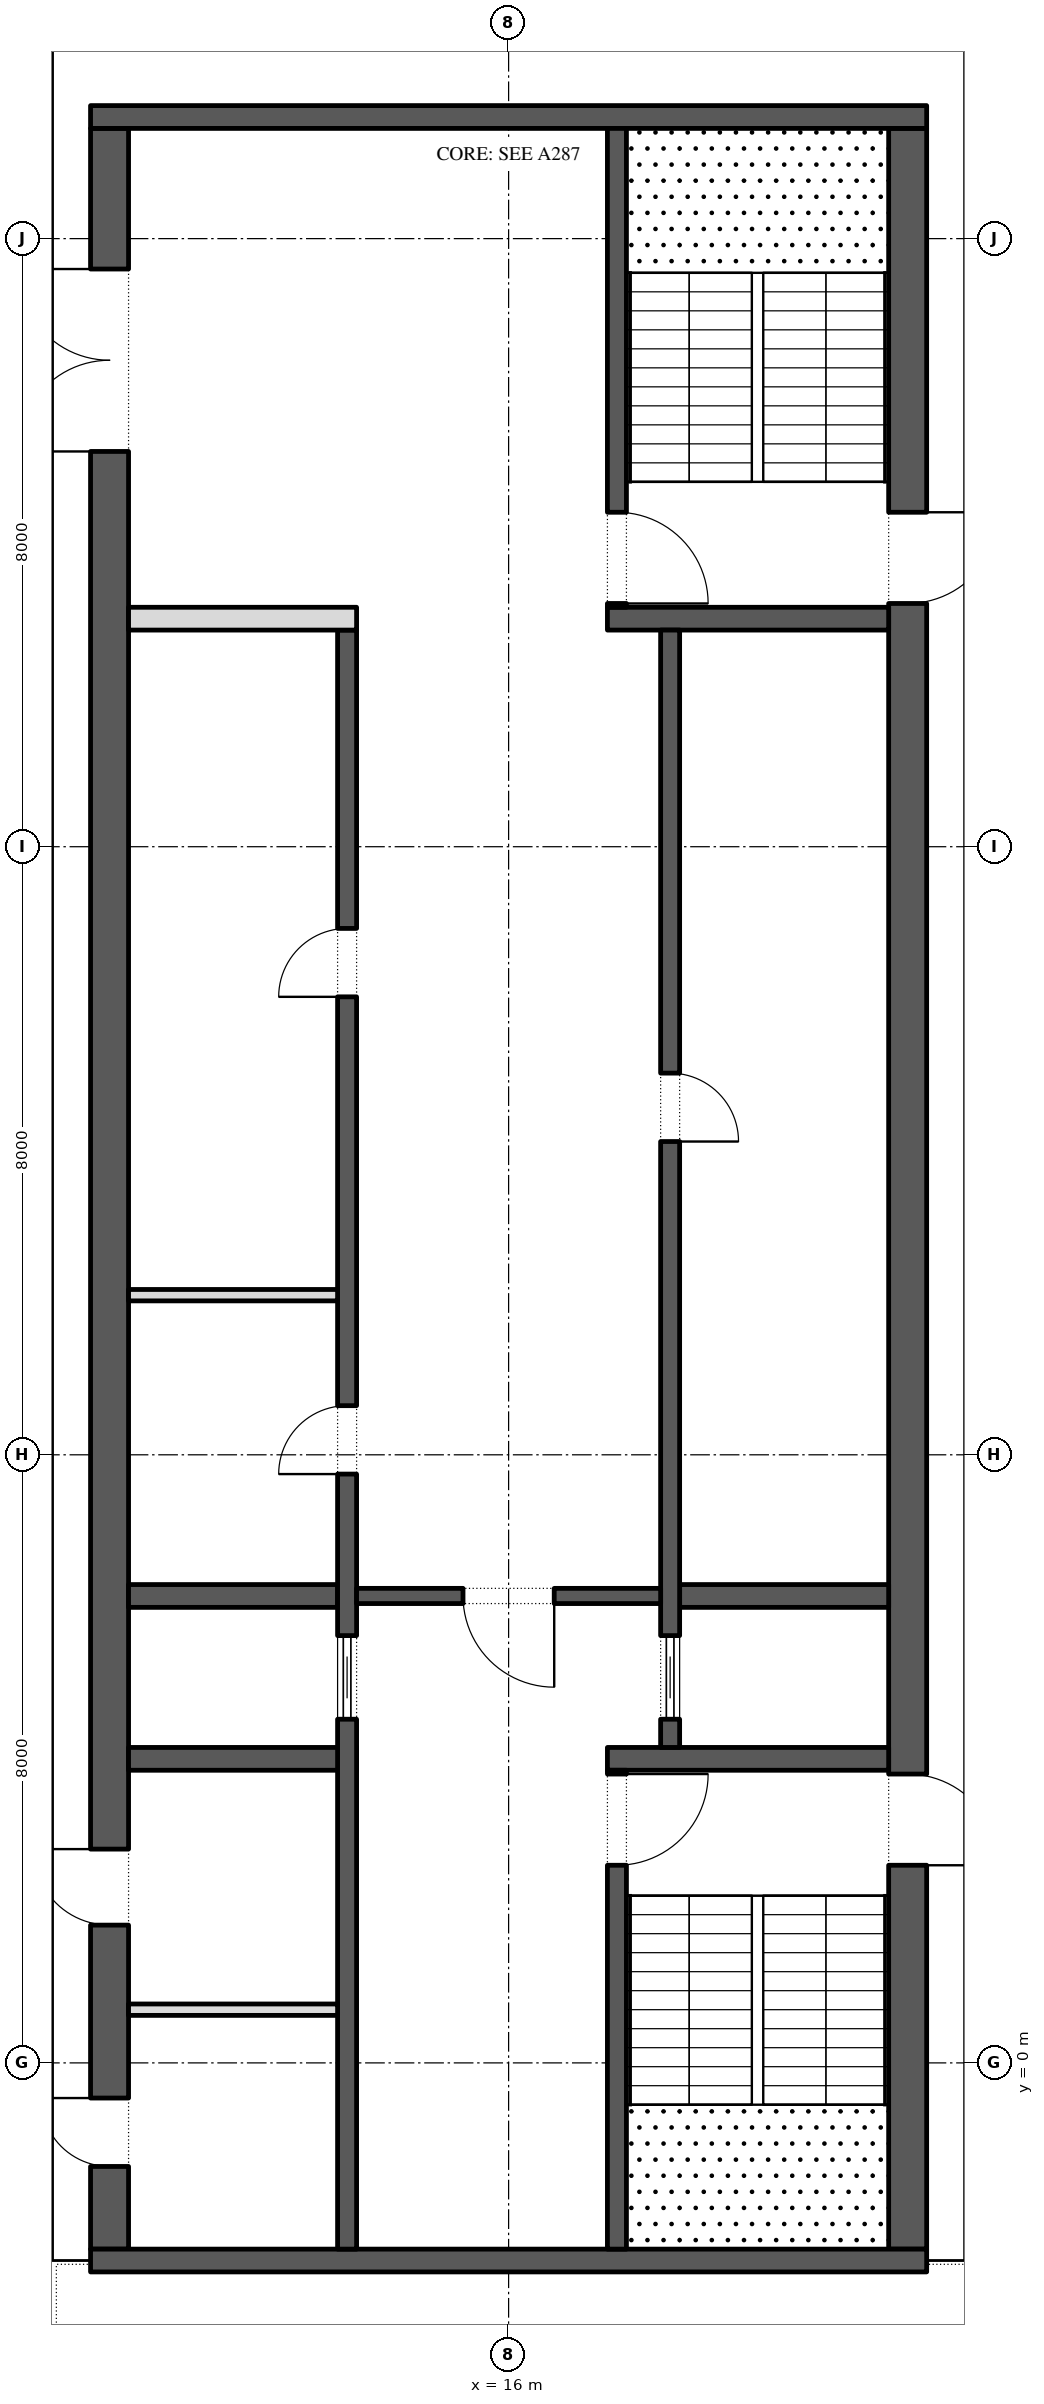
"""IFC4 building model, lengths in metres.
Left out: names, types, materials, properties, quantities, classifications, styles, units other than length and angle.
Written with IfcOpenShell. Run it as: python <this file> out.ifc"""

import sys

from ifc_helpers import new_model, si_unit, direction, frame, frame_2d, origin, place, context, subcontext, project, spatial, rectangle, extrude, element, fill, save


model = new_model("IFC4")
c1 = context("Model", 3, precision=1e-05, world=origin(), true_north=direction((0.0, 1.0)))
c2 = subcontext(c1, "Body", "Model", "MODEL_VIEW")
j1 = project(units=[si_unit("LENGTHUNIT", "METRE"), si_unit("PLANEANGLEUNIT", "RADIAN")], contexts=[c1])
p1 = place(None, origin())
s1 = spatial("IfcSite", under=j1, at=p1, CompositionType="ELEMENT")
p2 = place(p1, origin())
s2 = spatial("IfcBuilding", under=s1, at=p2, CompositionType="ELEMENT")
p3 = place(p2, frame((0.0, 0.0, 381.6)))
s3 = spatial("IfcBuildingStorey", under=s2, at=p3, CompositionType="ELEMENT", Elevation=381.6)
p4 = place(p3, frame((21.25, -2.45, 0.0), z_axis=(0.0, 0.0, 1.0), x_axis=(0.0, 1.0, 0.0)))
e1 = element("IfcWall", 1, at=p4, inside=s3, PredefinedType="SHEAR", context=c2, shape_type="SweptSolid", body=[
    extrude(rectangle(XDim=27.9, YDim=0.5, at=frame_2d((13.95, 0.0))), origin(), (0.0, 0.0, 1.0), 4.0),
])
p5 = place(p4, frame((5.05, 0.0, 0.0)))
e2 = element("IfcOpeningElement", 2, at=p5, cuts=e1, PredefinedType="OPENING", context=c2, shape_type="SweptSolid", body=[
    extrude(rectangle(XDim=1.2, YDim=2.1, at=frame_2d((0.6, 1.05))), frame((0.0, 0.26, 0.0), z_axis=(0.0, -1.0, 0.0), x_axis=(1.0, 0.0, 0.0)), (0.0, 0.0, 1.0), 0.52),
])
p6 = place(p4, frame((21.65, 0.0, 0.0)))
e3 = element("IfcOpeningElement", 3, at=p6, cuts=e1, PredefinedType="OPENING", context=c2, shape_type="SweptSolid", body=[
    extrude(rectangle(XDim=1.2, YDim=2.1, at=frame_2d((0.6, 1.05))), frame((0.0, 0.26, 0.0), z_axis=(0.0, -1.0, 0.0), x_axis=(1.0, 0.0, 0.0)), (0.0, 0.0, 1.0), 0.52),
])
p7 = place(p3, frame((10.75, -2.45, 0.0), z_axis=(0.0, 0.0, 1.0), x_axis=(0.0, 1.0, 0.0)))
e4 = element("IfcWall", 4, at=p7, inside=s3, PredefinedType="SHEAR", context=c2, shape_type="SweptSolid", body=[
    extrude(rectangle(XDim=27.9, YDim=0.5, at=frame_2d((13.95, 0.0))), origin(), (0.0, 0.0, 1.0), 4.0),
])
p8 = place(p7, frame((23.65, 0.0, 0.0)))
e5 = element("IfcOpeningElement", 5, at=p8, cuts=e4, PredefinedType="OPENING", context=c2, shape_type="SweptSolid", body=[
    extrude(rectangle(XDim=2.4, YDim=2.1, at=frame_2d((1.2, 1.05))), frame((0.0, 0.26, 0.0), z_axis=(0.0, -1.0, 0.0), x_axis=(1.0, 0.0, 0.0)), (0.0, 0.0, 1.0), 0.52),
])
p9 = place(p7, frame((1.087, 0.0, 0.0)))
e6 = element("IfcOpeningElement", 6, at=p9, cuts=e4, PredefinedType="OPENING", context=c2, shape_type="SweptSolid", body=[
    extrude(rectangle(XDim=0.9, YDim=2.1, at=frame_2d((0.45, 1.05))), frame((0.0, 0.26, 0.0), z_axis=(0.0, -1.0, 0.0), x_axis=(1.0, 0.0, 0.0)), (0.0, 0.0, 1.0), 0.52),
])
p10 = place(p7, frame((4.262, 0.0, 0.0)))
e7 = element("IfcOpeningElement", 7, at=p10, cuts=e4, PredefinedType="OPENING", context=c2, shape_type="SweptSolid", body=[
    extrude(rectangle(XDim=1.0, YDim=2.1, at=frame_2d((0.5, 1.05))), frame((0.0, 0.26, 0.0), z_axis=(0.0, -1.0, 0.0), x_axis=(1.0, 0.0, 0.0)), (0.0, 0.0, 1.0), 0.52),
])
for number, where, z_axis, x_axis in (
    (8, (10.5, -2.6, 0.0), (0.0, 0.0, 1.0), (1.0, 0.0, 0.0)),
    (9, (10.5, 25.6, 0.0), (0.0, 0.0, 1.0), (1.0, 0.0, 0.0)),
):
    element("IfcWall", number, at=place(p3, frame(where, z_axis=z_axis, x_axis=x_axis)), inside=s3, PredefinedType="SHEAR", context=c2, shape_type="SweptSolid", body=[
        extrude(rectangle(XDim=11.0, YDim=0.3, at=frame_2d((5.5, 0.0))), origin(), (0.0, 0.0, 1.0), 4.0),
    ])
p11 = place(p3, frame((17.3, 4.0, 0.0), z_axis=(0.0, 0.0, 1.0), x_axis=(1.0, 0.0, 0.0)))
e10 = element("IfcWall", 10, at=p11, inside=s3, PredefinedType="SHEAR", context=c2, shape_type="SweptSolid", body=[
    extrude(rectangle(XDim=3.7, YDim=0.3, at=frame_2d((1.85, 0.0))), origin(), (0.0, 0.0, 1.0), 4.0),
])
p12 = place(p3, frame((17.425, -2.45, 0.0), z_axis=(0.0, 0.0, 1.0), x_axis=(0.0, 1.0, 0.0)))
e11 = element("IfcWall", 11, at=p12, inside=s3, PredefinedType="SHEAR", context=c2, shape_type="SweptSolid", body=[
    extrude(rectangle(XDim=6.3, YDim=0.25, at=frame_2d((3.15, 0.0))), origin(), (0.0, 0.0, 1.0), 4.0),
])
p13 = place(p12, frame((5.05, 0.0, 0.0)))
e12 = element("IfcOpeningElement", 12, at=p13, cuts=e11, PredefinedType="OPENING", context=c2, shape_type="SweptSolid", body=[
    extrude(rectangle(XDim=1.2, YDim=2.1, at=frame_2d((0.6, 1.05))), frame((0.0, 0.135, 0.0), z_axis=(0.0, -1.0, 0.0), x_axis=(1.0, 0.0, 0.0)), (0.0, 0.0, 1.0), 0.27),
])
p14 = place(p3, frame((17.3, 19.0, 0.0), z_axis=(0.0, 0.0, 1.0), x_axis=(1.0, 0.0, 0.0)))
e13 = element("IfcWall", 13, at=p14, inside=s3, PredefinedType="SHEAR", context=c2, shape_type="SweptSolid", body=[
    extrude(rectangle(XDim=3.7, YDim=0.3, at=frame_2d((1.85, 0.0))), origin(), (0.0, 0.0, 1.0), 4.0),
])
p15 = place(p3, frame((17.425, 19.15, 0.0), z_axis=(0.0, 0.0, 1.0), x_axis=(0.0, 1.0, 0.0)))
e14 = element("IfcWall", 14, at=p15, inside=s3, PredefinedType="SHEAR", context=c2, shape_type="SweptSolid", body=[
    extrude(rectangle(XDim=6.3, YDim=0.25, at=frame_2d((3.15, 0.0))), origin(), (0.0, 0.0, 1.0), 4.0),
])
p16 = place(p15, frame((0.05, 0.0, 0.0)))
e15 = element("IfcOpeningElement", 15, at=p16, cuts=e14, PredefinedType="OPENING", context=c2, shape_type="SweptSolid", body=[
    extrude(rectangle(XDim=1.2, YDim=2.1, at=frame_2d((0.6, 1.05))), frame((0.0, 0.135, 0.0), z_axis=(0.0, -1.0, 0.0), x_axis=(1.0, 0.0, 0.0)), (0.0, 0.0, 1.0), 0.27),
])
p17 = place(p3, frame((18.25, 6.143, 0.0), z_axis=(0.0, 0.0, 1.0), x_axis=(1.0, 0.0, 0.0)))
e16 = element("IfcWall", 16, at=p17, inside=s3, PredefinedType="SHEAR", context=c2, shape_type="SweptSolid", body=[
    extrude(rectangle(XDim=2.75, YDim=0.3, at=frame_2d((1.375, 0.0))), origin(), (0.0, 0.0, 1.0), 4.0),
])
p18 = place(p3, frame((18.125, 4.15, 0.0), z_axis=(0.0, 0.0, 1.0), x_axis=(0.0, 1.0, 0.0)))
e17 = element("IfcWall", 17, at=p18, inside=s3, PredefinedType="SHEAR", context=c2, shape_type="SweptSolid", body=[
    extrude(rectangle(XDim=14.7, YDim=0.25, at=frame_2d((7.35, 0.0))), origin(), (0.0, 0.0, 1.0), 4.0),
])
p19 = place(p18, frame((7.971, 0.0, 0.0)))
e18 = element("IfcOpeningElement", 18, at=p19, cuts=e17, PredefinedType="OPENING", context=c2, shape_type="SweptSolid", body=[
    extrude(rectangle(XDim=0.9, YDim=2.1, at=frame_2d((0.45, 1.05))), frame((0.0, 0.135, 0.0), z_axis=(0.0, -1.0, 0.0), x_axis=(1.0, 0.0, 0.0)), (0.0, 0.0, 1.0), 0.27),
])
p20 = place(p18, frame((0.371, 0.0, 0.0)))
e19 = element("IfcOpeningElement", 19, at=p20, cuts=e17, PredefinedType="OPENING", context=c2, shape_type="SweptSolid", body=[
    extrude(rectangle(XDim=1.1, YDim=2.1, at=frame_2d((0.55, 1.05))), frame((0.0, 0.135, 0.0), z_axis=(0.0, -1.0, 0.0), x_axis=(1.0, 0.0, 0.0)), (0.0, 0.0, 1.0), 0.27),
])
p21 = place(p3, frame((11.0, 4.0, 0.0), z_axis=(0.0, 0.0, 1.0), x_axis=(1.0, 0.0, 0.0)))
e20 = element("IfcWall", 20, at=p21, inside=s3, PredefinedType="SHEAR", context=c2, shape_type="SweptSolid", body=[
    extrude(rectangle(XDim=3.0, YDim=0.3, at=frame_2d((1.5, 0.0))), origin(), (0.0, 0.0, 1.0), 4.0),
])
p22 = place(p3, frame((11.0, 6.143, 0.0), z_axis=(0.0, 0.0, 1.0), x_axis=(1.0, 0.0, 0.0)))
e21 = element("IfcWall", 21, at=p22, inside=s3, PredefinedType="SHEAR", context=c2, shape_type="SweptSolid", body=[
    extrude(rectangle(XDim=2.75, YDim=0.3, at=frame_2d((1.375, 0.0))), origin(), (0.0, 0.0, 1.0), 4.0),
])
p23 = place(p3, frame((13.875, -2.45, 0.0), z_axis=(0.0, 0.0, 1.0), x_axis=(0.0, 1.0, 0.0)))
e22 = element("IfcWall", 22, at=p23, inside=s3, PredefinedType="SHEAR", context=c2, shape_type="SweptSolid", body=[
    extrude(rectangle(XDim=21.3, YDim=0.25, at=frame_2d((10.65, 0.0))), origin(), (0.0, 0.0, 1.0), 4.0),
])
p24 = place(p23, frame((10.196, 0.0, 0.0)))
e23 = element("IfcOpeningElement", 23, at=p24, cuts=e22, PredefinedType="OPENING", context=c2, shape_type="SweptSolid", body=[
    extrude(rectangle(XDim=0.9, YDim=2.1, at=frame_2d((0.45, 1.05))), frame((0.0, 0.135, 0.0), z_axis=(0.0, -1.0, 0.0), x_axis=(1.0, 0.0, 0.0)), (0.0, 0.0, 1.0), 0.27),
])
p25 = place(p23, frame((16.475, 0.0, 0.0)))
e24 = element("IfcOpeningElement", 24, at=p25, cuts=e22, PredefinedType="OPENING", context=c2, shape_type="SweptSolid", body=[
    extrude(rectangle(XDim=0.9, YDim=2.1, at=frame_2d((0.45, 1.05))), frame((0.0, 0.135, 0.0), z_axis=(0.0, -1.0, 0.0), x_axis=(1.0, 0.0, 0.0)), (0.0, 0.0, 1.0), 0.27),
])
p26 = place(p23, frame((6.971, 0.0, 0.0)))
e25 = element("IfcOpeningElement", 25, at=p26, cuts=e22, PredefinedType="OPENING", context=c2, shape_type="SweptSolid", body=[
    extrude(rectangle(XDim=1.1, YDim=2.1, at=frame_2d((0.55, 1.05))), frame((0.0, 0.135, 0.0), z_axis=(0.0, -1.0, 0.0), x_axis=(1.0, 0.0, 0.0)), (0.0, 0.0, 1.0), 0.27),
])
p27 = place(p3, frame((11.0, 19.0, 0.0), z_axis=(0.0, 0.0, 1.0), x_axis=(1.0, 0.0, 0.0)))
e26 = element("IfcWall", 26, at=p27, inside=s3, PredefinedType="PARTITIONING", context=c2, shape_type="SweptSolid", body=[
    extrude(rectangle(XDim=3.0, YDim=0.3, at=frame_2d((1.5, 0.0))), origin(), (0.0, 0.0, 1.0), 4.0),
])
p28 = place(p3, frame((11.0, 10.1, 0.0), z_axis=(0.0, 0.0, 1.0), x_axis=(1.0, 0.0, 0.0)))
e27 = element("IfcWall", 27, at=p28, inside=s3, PredefinedType="PARTITIONING", context=c2, shape_type="SweptSolid", body=[
    extrude(rectangle(XDim=2.75, YDim=0.15, at=frame_2d((1.375, 0.0))), origin(), (0.0, 0.0, 1.0), 4.0),
])
p29 = place(p3, frame((14.0, 6.143, 0.0), z_axis=(0.0, 0.0, 1.0), x_axis=(1.0, 0.0, 0.0)))
e28 = element("IfcWall", 28, at=p29, inside=s3, PredefinedType="SHEAR", context=c2, shape_type="SweptSolid", body=[
    extrude(rectangle(XDim=4.0, YDim=0.2, at=frame_2d((2.0, 0.0))), origin(), (0.0, 0.0, 1.0), 4.0),
])
p30 = place(p29, frame((1.4, 0.0, 0.0)))
e29 = element("IfcOpeningElement", 29, at=p30, cuts=e28, PredefinedType="OPENING", context=c2, shape_type="SweptSolid", body=[
    extrude(rectangle(XDim=1.2, YDim=2.1, at=frame_2d((0.6, 1.05))), frame((0.0, 0.11, 0.0), z_axis=(0.0, -1.0, 0.0), x_axis=(1.0, 0.0, 0.0)), (0.0, 0.0, 1.0), 0.22),
])
p31 = place(p3, frame((11.0, 0.7, 0.0), z_axis=(0.0, 0.0, 1.0), x_axis=(1.0, 0.0, 0.0)))
e30 = element("IfcWall", 30, at=p31, inside=s3, PredefinedType="PARTITIONING", context=c2, shape_type="SweptSolid", body=[
    extrude(rectangle(XDim=2.75, YDim=0.15, at=frame_2d((1.375, 0.0))), origin(), (0.0, 0.0, 1.0), 4.0),
])
p32 = place(p19, frame((0.9, -0.2, 0.0), z_axis=(0.0, 0.0, 1.0), x_axis=(-1.0, 0.0, 0.0)))
e31 = element("IfcDoor", 31, at=p32, inside=s3, OperationType="SINGLE_SWING_LEFT", PredefinedType="DOOR", context=c2, shape_type="SweptSolid", body=[
    extrude(rectangle(XDim=0.9, YDim=2.1, at=frame_2d((0.45, 1.05))), frame((0.0, -0.075, 0.0), z_axis=(0.0, -1.0, 0.0), x_axis=(1.0, 0.0, 0.0)), (0.0, 0.0, 1.0), 0.05),
])
fill(e18, e31)
p33 = place(p20, origin())
e32 = element("IfcDoor", 32, at=p33, inside=s3, OperationType="SLIDING_TO_LEFT", PredefinedType="DOOR", context=c2, shape_type="SweptSolid", body=[
    extrude(rectangle(XDim=1.1, YDim=2.1, at=frame_2d((0.55, 1.05))), frame((0.0, 0.025, 0.0), z_axis=(0.0, -1.0, 0.0), x_axis=(1.0, 0.0, 0.0)), (0.0, 0.0, 1.0), 0.05),
])
fill(e19, e32)
p34 = place(p24, origin())
e33 = element("IfcDoor", 33, at=p34, inside=s3, OperationType="SINGLE_SWING_RIGHT", PredefinedType="DOOR", context=c2, shape_type="SweptSolid", body=[
    extrude(rectangle(XDim=0.9, YDim=2.1, at=frame_2d((0.45, 1.05))), frame((0.0, 0.125, 0.0), z_axis=(0.0, -1.0, 0.0), x_axis=(1.0, 0.0, 0.0)), (0.0, 0.0, 1.0), 0.05),
])
fill(e23, e33)
p35 = place(p25, origin())
e34 = element("IfcDoor", 34, at=p35, inside=s3, OperationType="SINGLE_SWING_RIGHT", PredefinedType="DOOR", context=c2, shape_type="SweptSolid", body=[
    extrude(rectangle(XDim=0.9, YDim=2.1, at=frame_2d((0.45, 1.05))), frame((0.0, 0.125, 0.0), z_axis=(0.0, -1.0, 0.0), x_axis=(1.0, 0.0, 0.0)), (0.0, 0.0, 1.0), 0.05),
])
fill(e24, e34)
p36 = place(p26, origin())
e35 = element("IfcDoor", 35, at=p36, inside=s3, OperationType="SLIDING_TO_LEFT", PredefinedType="DOOR", context=c2, shape_type="SweptSolid", body=[
    extrude(rectangle(XDim=1.1, YDim=2.1, at=frame_2d((0.55, 1.05))), frame((0.0, 0.025, 0.0), z_axis=(0.0, -1.0, 0.0), x_axis=(1.0, 0.0, 0.0)), (0.0, 0.0, 1.0), 0.05),
])
fill(e25, e35)
p37 = place(p30, frame((1.2, 0.0, 0.0), z_axis=(0.0, 0.0, 1.0), x_axis=(-1.0, 0.0, 0.0)))
e36 = element("IfcDoor", 36, at=p37, inside=s3, OperationType="SINGLE_SWING_RIGHT", PredefinedType="DOOR", context=c2, shape_type="SweptSolid", body=[
    extrude(rectangle(XDim=1.2, YDim=2.1, at=frame_2d((0.6, 1.05))), frame((0.0, 0.025, 0.0), z_axis=(0.0, -1.0, 0.0), x_axis=(1.0, 0.0, 0.0)), (0.0, 0.0, 1.0), 0.05),
])
fill(e29, e36)
p38 = place(p8, origin())
e37 = element("IfcDoor", 37, at=p38, inside=s3, OperationType="DOUBLE_DOOR_SINGLE_SWING", PredefinedType="DOOR", context=c2, shape_type="SweptSolid", body=[
    extrude(rectangle(XDim=2.4, YDim=2.1, at=frame_2d((1.2, 1.05))), frame((0.0, 0.025, 0.0), z_axis=(0.0, -1.0, 0.0), x_axis=(1.0, 0.0, 0.0)), (0.0, 0.0, 1.0), 0.05),
])
fill(e5, e37)
p39 = place(p13, frame((1.2, 0.0, 0.0), z_axis=(0.0, 0.0, 1.0), x_axis=(-1.0, 0.0, 0.0)))
e38 = element("IfcDoor", 38, at=p39, inside=s3, OperationType="SINGLE_SWING_RIGHT", PredefinedType="DOOR", context=c2, shape_type="SweptSolid", body=[
    extrude(rectangle(XDim=1.2, YDim=2.1, at=frame_2d((0.6, 1.05))), frame((0.0, 0.025, 0.0), z_axis=(0.0, -1.0, 0.0), x_axis=(1.0, 0.0, 0.0)), (0.0, 0.0, 1.0), 0.05),
])
fill(e12, e38)
p40 = place(p5, frame((1.2, 0.0, 0.0), z_axis=(0.0, 0.0, 1.0), x_axis=(-1.0, 0.0, 0.0)))
e39 = element("IfcDoor", 39, at=p40, inside=s3, OperationType="SINGLE_SWING_LEFT", PredefinedType="DOOR", context=c2, shape_type="SweptSolid", body=[
    extrude(rectangle(XDim=1.2, YDim=2.1, at=frame_2d((0.6, 1.05))), frame((0.0, 0.025, 0.0), z_axis=(0.0, -1.0, 0.0), x_axis=(1.0, 0.0, 0.0)), (0.0, 0.0, 1.0), 0.05),
])
fill(e2, e39)
p41 = place(p16, frame((1.2, 0.0, 0.0), z_axis=(0.0, 0.0, 1.0), x_axis=(-1.0, 0.0, 0.0)))
e40 = element("IfcDoor", 40, at=p41, inside=s3, OperationType="SINGLE_SWING_LEFT", PredefinedType="DOOR", context=c2, shape_type="SweptSolid", body=[
    extrude(rectangle(XDim=1.2, YDim=2.1, at=frame_2d((0.6, 1.05))), frame((0.0, 0.025, 0.0), z_axis=(0.0, -1.0, 0.0), x_axis=(1.0, 0.0, 0.0)), (0.0, 0.0, 1.0), 0.05),
])
fill(e15, e40)
p42 = place(p6, frame((1.2, 0.0, 0.0), z_axis=(0.0, 0.0, 1.0), x_axis=(-1.0, 0.0, 0.0)))
e41 = element("IfcDoor", 41, at=p42, inside=s3, OperationType="SINGLE_SWING_RIGHT", PredefinedType="DOOR", context=c2, shape_type="SweptSolid", body=[
    extrude(rectangle(XDim=1.2, YDim=2.1, at=frame_2d((0.6, 1.05))), frame((0.0, 0.025, 0.0), z_axis=(0.0, -1.0, 0.0), x_axis=(1.0, 0.0, 0.0)), (0.0, 0.0, 1.0), 0.05),
])
fill(e3, e41)
p43 = place(p9, origin())
e42 = element("IfcDoor", 42, at=p43, inside=s3, OperationType="SINGLE_SWING_LEFT", PredefinedType="DOOR", context=c2, shape_type="SweptSolid", body=[
    extrude(rectangle(XDim=0.9, YDim=2.1, at=frame_2d((0.45, 1.05))), frame((0.0, -0.2, 0.0), z_axis=(0.0, -1.0, 0.0), x_axis=(1.0, 0.0, 0.0)), (0.0, 0.0, 1.0), 0.05),
])
fill(e6, e42)
p44 = place(p10, origin())
e43 = element("IfcDoor", 43, at=p44, inside=s3, OperationType="SINGLE_SWING_LEFT", PredefinedType="DOOR", context=c2, shape_type="SweptSolid", body=[
    extrude(rectangle(XDim=1.0, YDim=2.1, at=frame_2d((0.5, 1.05))), frame((0.0, -0.2, 0.0), z_axis=(0.0, -1.0, 0.0), x_axis=(1.0, 0.0, 0.0)), (0.0, 0.0, 1.0), 0.05),
])
fill(e7, e43)
save(model, sys.argv[1])
